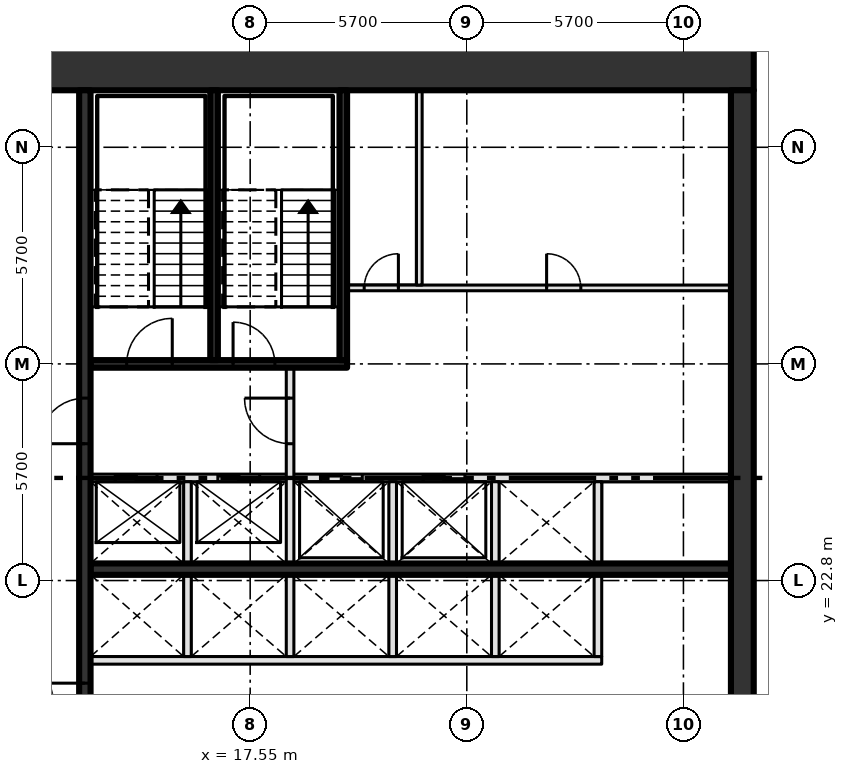
"""IFC4 building model, lengths in metres.
Left out: names, types, materials, properties, quantities, classifications, styles, units other than length and angle.
Written with IfcOpenShell. Run it as: python <this file> out.ifc"""

import sys

from ifc_helpers import new_model, si_unit, direction, frame, frame_2d, origin, place, context, subcontext, project, spatial, rectangle, extrude, element, fill, save


model = new_model("IFC4")
c1 = context("Model", 3, precision=1e-05, world=origin(), true_north=direction((0.0, 1.0)))
c2 = subcontext(c1, "Body", "Model", "MODEL_VIEW")
j1 = project(units=[si_unit("LENGTHUNIT", "METRE"), si_unit("PLANEANGLEUNIT", "RADIAN")], contexts=[c1])
p1 = place(None, origin())
s1 = spatial("IfcSite", under=j1, at=p1, CompositionType="ELEMENT")
p2 = place(p1, origin())
s2 = spatial("IfcBuilding", under=s1, at=p2, CompositionType="ELEMENT")
p3 = place(p2, frame((0.0, 0.0, 289.8)))
s3 = spatial("IfcBuildingStorey", under=s2, at=p3, CompositionType="ELEMENT", Elevation=289.8)
p4 = place(p3, frame((8.0, 36.3, -0.3), z_axis=(0.0, 0.0, 1.0), x_axis=(1.0, 0.0, 0.0)))
e1 = element("IfcWall", 1, at=p4, inside=s3, PredefinedType="SHEAR", context=c2, shape_type="SweptSolid", body=[
    extrude(rectangle(XDim=22.8, YDim=1.2, at=frame_2d((11.4, 0.0))), origin(), (0.0, 0.0, 1.0), 4.2),
])
p5 = place(p4, frame((2.3, 0.0, 0.3)))
e2 = element("IfcOpeningElement", 2, at=p5, cuts=e1, PredefinedType="OPENING", context=c2, shape_type="SweptSolid", body=[
    extrude(rectangle(XDim=1.8, YDim=2.1, at=frame_2d((0.9, 1.05))), frame((0.0, 0.61, 0.0), z_axis=(0.0, -1.0, 0.0), x_axis=(1.0, 0.0, 0.0)), (0.0, 0.0, 1.0), 1.22),
])
p6 = place(p3, frame((30.5, 14.7, -0.3), z_axis=(0.0, 0.0, 1.0), x_axis=(0.0, 1.0, 0.0)))
e3 = element("IfcWall", 3, at=p6, inside=s3, PredefinedType="SHEAR", context=c2, shape_type="SweptSolid", body=[
    extrude(rectangle(XDim=21.0, YDim=0.6, at=frame_2d((10.5, 0.0))), origin(), (0.0, 0.0, 1.0), 4.2),
])
p7 = place(p3, frame((13.35, 20.7, 0.0), z_axis=(0.0, 0.0, 1.0), x_axis=(1.0, 0.0, 0.0)))
e4 = element("IfcWall", 4, at=p7, inside=s3, PredefinedType="SOLIDWALL", context=c2, shape_type="SweptSolid", body=[
    extrude(rectangle(XDim=13.45, YDim=0.2, at=frame_2d((6.725, 0.0))), origin(), (0.0, 0.0, 1.0), 3.9),
])
p8 = place(p3, frame((13.35, 23.1, 0.0), z_axis=(0.0, 0.0, 1.0), x_axis=(1.0, 0.0, 0.0)))
e5 = element("IfcWall", 5, at=p8, inside=s3, PredefinedType="SHEAR", context=c2, shape_type="SweptSolid", body=[
    extrude(rectangle(XDim=16.85, YDim=0.3, at=frame_2d((8.425, 0.0))), origin(), (0.0, 0.0, 1.0), 3.9),
])
p9 = place(p3, frame((13.35, 25.5, 0.0), z_axis=(0.0, 0.0, 1.0), x_axis=(1.0, 0.0, 0.0)))
e6 = element("IfcWall", 6, at=p9, inside=s3, PredefinedType="SOLIDWALL", context=c2, shape_type="SweptSolid", body=[
    extrude(rectangle(XDim=16.85, YDim=0.2, at=frame_2d((8.425, 0.0))), origin(), (0.0, 0.0, 1.0), 3.9),
])
p10 = place(p9, frame((0.65, 0.0, 0.0)))
e7 = element("IfcOpeningElement", 7, at=p10, cuts=e6, PredefinedType="OPENING", context=c2, shape_type="SweptSolid", body=[
    extrude(rectangle(XDim=1.1, YDim=2.1, at=frame_2d((0.55, 1.05))), frame((0.0, 0.11, 0.0), z_axis=(0.0, -1.0, 0.0), x_axis=(1.0, 0.0, 0.0)), (0.0, 0.0, 1.0), 0.22),
])
p11 = place(p9, frame((3.35, 0.0, 0.0)))
e8 = element("IfcOpeningElement", 8, at=p11, cuts=e6, PredefinedType="OPENING", context=c2, shape_type="SweptSolid", body=[
    extrude(rectangle(XDim=1.1, YDim=2.1, at=frame_2d((0.55, 1.05))), frame((0.0, 0.11, 0.0), z_axis=(0.0, -1.0, 0.0), x_axis=(1.0, 0.0, 0.0)), (0.0, 0.0, 1.0), 0.22),
])
p12 = place(p9, frame((6.05, 0.0, 0.0)))
e9 = element("IfcOpeningElement", 9, at=p12, cuts=e6, PredefinedType="OPENING", context=c2, shape_type="SweptSolid", body=[
    extrude(rectangle(XDim=1.1, YDim=2.1, at=frame_2d((0.55, 1.05))), frame((0.0, 0.11, 0.0), z_axis=(0.0, -1.0, 0.0), x_axis=(1.0, 0.0, 0.0)), (0.0, 0.0, 1.0), 0.22),
])
p13 = place(p9, frame((8.75, 0.0, 0.0)))
e10 = element("IfcOpeningElement", 10, at=p13, cuts=e6, PredefinedType="OPENING", context=c2, shape_type="SweptSolid", body=[
    extrude(rectangle(XDim=1.1, YDim=2.1, at=frame_2d((0.55, 1.05))), frame((0.0, 0.11, 0.0), z_axis=(0.0, -1.0, 0.0), x_axis=(1.0, 0.0, 0.0)), (0.0, 0.0, 1.0), 0.22),
])
p14 = place(p3, frame((13.35, 28.5, 0.0), z_axis=(0.0, 0.0, 1.0), x_axis=(1.0, 0.0, 0.0)))
e11 = element("IfcWall", 11, at=p14, inside=s3, PredefinedType="SOLIDWALL", context=c2, shape_type="SweptSolid", body=[
    extrude(rectangle(XDim=6.75, YDim=0.2, at=frame_2d((3.375, 0.0))), origin(), (0.0, 0.0, 1.0), 3.9),
])
p15 = place(p14, frame((0.95, 0.0, 0.0)))
e12 = element("IfcOpeningElement", 12, at=p15, cuts=e11, PredefinedType="OPENING", context=c2, shape_type="SweptSolid", body=[
    extrude(rectangle(XDim=1.2, YDim=2.1, at=frame_2d((0.6, 1.05))), frame((0.0, 0.11, 0.0), z_axis=(0.0, -1.0, 0.0), x_axis=(1.0, 0.0, 0.0)), (0.0, 0.0, 1.0), 0.22),
])
p16 = place(p14, frame((3.75, 0.0, 0.0)))
e13 = element("IfcOpeningElement", 13, at=p16, cuts=e11, PredefinedType="OPENING", context=c2, shape_type="SweptSolid", body=[
    extrude(rectangle(XDim=1.1, YDim=2.1, at=frame_2d((0.55, 1.05))), frame((0.0, 0.11, 0.0), z_axis=(0.0, -1.0, 0.0), x_axis=(1.0, 0.0, 0.0)), (0.0, 0.0, 1.0), 0.22),
])
p17 = place(p3, frame((20.1, 30.5, 0.0), z_axis=(0.0, 0.0, 1.0), x_axis=(1.0, 0.0, 0.0)))
e14 = element("IfcWall", 14, at=p17, inside=s3, PredefinedType="PARTITIONING", context=c2, shape_type="SweptSolid", body=[
    extrude(rectangle(XDim=10.1, YDim=0.15, at=frame_2d((5.05, 0.0))), origin(), (0.0, 0.0, 1.0), 3.9),
])
p18 = place(p17, frame((0.45, 0.0, 0.0)))
e15 = element("IfcOpeningElement", 15, at=p18, cuts=e14, PredefinedType="OPENING", context=c2, shape_type="SweptSolid", body=[
    extrude(rectangle(XDim=0.9, YDim=2.1, at=frame_2d((0.45, 1.05))), frame((0.0, 0.085, 0.0), z_axis=(0.0, -1.0, 0.0), x_axis=(1.0, 0.0, 0.0)), (0.0, 0.0, 1.0), 0.17),
])
p19 = place(p17, frame((5.25, 0.0, 0.0)))
e16 = element("IfcOpeningElement", 16, at=p19, cuts=e14, PredefinedType="OPENING", context=c2, shape_type="SweptSolid", body=[
    extrude(rectangle(XDim=0.9, YDim=2.1, at=frame_2d((0.45, 1.05))), frame((0.0, 0.085, 0.0), z_axis=(0.0, -1.0, 0.0), x_axis=(1.0, 0.0, 0.0)), (0.0, 0.0, 1.0), 0.17),
])
p20 = place(p3, frame((13.2, 14.7, 0.0), z_axis=(0.0, 0.0, 1.0), x_axis=(0.0, 1.0, 0.0)))
e17 = element("IfcWall", 17, at=p20, inside=s3, PredefinedType="SHEAR", context=c2, shape_type="SweptSolid", body=[
    extrude(rectangle(XDim=21.0, YDim=0.3, at=frame_2d((10.5, 0.0))), origin(), (0.0, 0.0, 1.0), 3.9),
])
p21 = place(p20, frame((3.6, 0.0, 0.0)))
e18 = element("IfcOpeningElement", 18, at=p21, cuts=e17, PredefinedType="OPENING", context=c2, shape_type="SweptSolid", body=[
    extrude(rectangle(XDim=1.8, YDim=2.1, at=frame_2d((0.9, 1.05))), frame((0.0, 0.16, 0.0), z_axis=(0.0, -1.0, 0.0), x_axis=(1.0, 0.0, 0.0)), (0.0, 0.0, 1.0), 0.32),
])
p22 = place(p20, frame((11.7, 0.0, 0.0)))
e19 = element("IfcOpeningElement", 19, at=p22, cuts=e17, PredefinedType="OPENING", context=c2, shape_type="SweptSolid", body=[
    extrude(rectangle(XDim=1.2, YDim=2.1, at=frame_2d((0.6, 1.05))), frame((0.0, 0.16, 0.0), z_axis=(0.0, -1.0, 0.0), x_axis=(1.0, 0.0, 0.0)), (0.0, 0.0, 1.0), 0.32),
])
p23 = place(p3, frame((15.9, 20.8, 0.0), z_axis=(0.0, 0.0, 1.0), x_axis=(0.0, 1.0, 0.0)))
e20 = element("IfcWall", 20, at=p23, inside=s3, PredefinedType="SOLIDWALL", context=c2, shape_type="SweptSolid", body=[
    extrude(rectangle(XDim=4.6, YDim=0.2, at=frame_2d((2.3, 0.0))), origin(), (0.0, 0.0, 1.0), 3.9),
])
p24 = place(p3, frame((16.6, 28.6, 0.0), z_axis=(0.0, 0.0, 1.0), x_axis=(0.0, 1.0, 0.0)))
e21 = element("IfcWall", 21, at=p24, inside=s3, PredefinedType="SOLIDWALL", context=c2, shape_type="SweptSolid", body=[
    extrude(rectangle(XDim=7.1, YDim=0.2, at=frame_2d((3.55, 0.0))), origin(), (0.0, 0.0, 1.0), 3.9),
])
p25 = place(p3, frame((18.6, 20.8, 0.0), z_axis=(0.0, 0.0, 1.0), x_axis=(0.0, 1.0, 0.0)))
e22 = element("IfcWall", 22, at=p25, inside=s3, PredefinedType="SOLIDWALL", context=c2, shape_type="SweptSolid", body=[
    extrude(rectangle(XDim=7.6, YDim=0.2, at=frame_2d((3.8, 0.0))), origin(), (0.0, 0.0, 1.0), 3.9),
])
p26 = place(p25, frame((5.6, 0.0, 0.0)))
e23 = element("IfcOpeningElement", 23, at=p26, cuts=e22, PredefinedType="OPENING", context=c2, shape_type="SweptSolid", body=[
    extrude(rectangle(XDim=1.2, YDim=2.1, at=frame_2d((0.6, 1.05))), frame((0.0, 0.11, 0.0), z_axis=(0.0, -1.0, 0.0), x_axis=(1.0, 0.0, 0.0)), (0.0, 0.0, 1.0), 0.22),
])
p27 = place(p3, frame((20.0, 28.6, 0.0), z_axis=(0.0, 0.0, 1.0), x_axis=(0.0, 1.0, 0.0)))
e24 = element("IfcWall", 24, at=p27, inside=s3, PredefinedType="SOLIDWALL", context=c2, shape_type="SweptSolid", body=[
    extrude(rectangle(XDim=7.1, YDim=0.2, at=frame_2d((3.55, 0.0))), origin(), (0.0, 0.0, 1.0), 3.9),
])
p28 = place(p3, frame((21.3, 20.8, 0.0), z_axis=(0.0, 0.0, 1.0), x_axis=(0.0, 1.0, 0.0)))
e25 = element("IfcWall", 25, at=p28, inside=s3, PredefinedType="SOLIDWALL", context=c2, shape_type="SweptSolid", body=[
    extrude(rectangle(XDim=4.6, YDim=0.2, at=frame_2d((2.3, 0.0))), origin(), (0.0, 0.0, 1.0), 3.9),
])
p29 = place(p3, frame((22.0, 30.575, 0.0), z_axis=(0.0, 0.0, 1.0), x_axis=(0.0, 1.0, 0.0)))
e26 = element("IfcWall", 26, at=p29, inside=s3, PredefinedType="PARTITIONING", context=c2, shape_type="SweptSolid", body=[
    extrude(rectangle(XDim=5.125, YDim=0.15, at=frame_2d((2.562, 0.0))), origin(), (0.0, 0.0, 1.0), 3.9),
])
for number, where, z_axis, x_axis in (
    (27, (24.0, 20.8, 0.0), (0.0, 0.0, 1.0), (0.0, 1.0, 0.0)),
    (28, (26.7, 20.8, 0.0), (0.0, 0.0, 1.0), (0.0, 1.0, 0.0)),
):
    element("IfcWall", number, at=place(p3, frame(where, z_axis=z_axis, x_axis=x_axis)), inside=s3, PredefinedType="SOLIDWALL", context=c2, shape_type="SweptSolid", body=[
        extrude(rectangle(XDim=4.6, YDim=0.2, at=frame_2d((2.3, 0.0))), origin(), (0.0, 0.0, 1.0), 3.9),
    ])
p30 = place(p10, origin())
e29 = element("IfcDoor", 29, at=p30, inside=s3, OperationType="SLIDING_TO_LEFT", PredefinedType="DOOR", context=c2, shape_type="SweptSolid", body=[
    extrude(rectangle(XDim=1.1, YDim=2.1, at=frame_2d((0.55, 1.05))), frame((0.0, 0.025, 0.0), z_axis=(0.0, -1.0, 0.0), x_axis=(1.0, 0.0, 0.0)), (0.0, 0.0, 1.0), 0.05),
])
fill(e7, e29)
p31 = place(p11, origin())
e30 = element("IfcDoor", 30, at=p31, inside=s3, OperationType="SLIDING_TO_LEFT", PredefinedType="DOOR", context=c2, shape_type="SweptSolid", body=[
    extrude(rectangle(XDim=1.1, YDim=2.1, at=frame_2d((0.55, 1.05))), frame((0.0, 0.025, 0.0), z_axis=(0.0, -1.0, 0.0), x_axis=(1.0, 0.0, 0.0)), (0.0, 0.0, 1.0), 0.05),
])
fill(e8, e30)
p32 = place(p12, origin())
e31 = element("IfcDoor", 31, at=p32, inside=s3, OperationType="SLIDING_TO_LEFT", PredefinedType="DOOR", context=c2, shape_type="SweptSolid", body=[
    extrude(rectangle(XDim=1.1, YDim=2.1, at=frame_2d((0.55, 1.05))), frame((0.0, 0.025, 0.0), z_axis=(0.0, -1.0, 0.0), x_axis=(1.0, 0.0, 0.0)), (0.0, 0.0, 1.0), 0.05),
])
fill(e9, e31)
p33 = place(p13, origin())
e32 = element("IfcDoor", 32, at=p33, inside=s3, OperationType="SLIDING_TO_LEFT", PredefinedType="DOOR", context=c2, shape_type="SweptSolid", body=[
    extrude(rectangle(XDim=1.1, YDim=2.1, at=frame_2d((0.55, 1.05))), frame((0.0, 0.025, 0.0), z_axis=(0.0, -1.0, 0.0), x_axis=(1.0, 0.0, 0.0)), (0.0, 0.0, 1.0), 0.05),
])
fill(e10, e32)
p34 = place(p18, origin())
e33 = element("IfcDoor", 33, at=p34, inside=s3, OperationType="SINGLE_SWING_RIGHT", PredefinedType="DOOR", context=c2, shape_type="SweptSolid", body=[
    extrude(rectangle(XDim=0.9, YDim=2.1, at=frame_2d((0.45, 1.05))), frame((0.0, 0.025, 0.0), z_axis=(0.0, -1.0, 0.0), x_axis=(1.0, 0.0, 0.0)), (0.0, 0.0, 1.0), 0.05),
])
fill(e15, e33)
p35 = place(p19, origin())
e34 = element("IfcDoor", 34, at=p35, inside=s3, OperationType="SINGLE_SWING_LEFT", PredefinedType="DOOR", context=c2, shape_type="SweptSolid", body=[
    extrude(rectangle(XDim=0.9, YDim=2.1, at=frame_2d((0.45, 1.05))), frame((0.0, 0.025, 0.0), z_axis=(0.0, -1.0, 0.0), x_axis=(1.0, 0.0, 0.0)), (0.0, 0.0, 1.0), 0.05),
])
fill(e16, e34)
p36 = place(p15, origin())
e35 = element("IfcDoor", 35, at=p36, inside=s3, OperationType="SINGLE_SWING_RIGHT", PredefinedType="DOOR", context=c2, shape_type="SweptSolid", body=[
    extrude(rectangle(XDim=1.2, YDim=2.1, at=frame_2d((0.6, 1.05))), frame((0.0, 0.025, 0.0), z_axis=(0.0, -1.0, 0.0), x_axis=(1.0, 0.0, 0.0)), (0.0, 0.0, 1.0), 0.05),
])
fill(e12, e35)
p37 = place(p16, origin())
e36 = element("IfcDoor", 36, at=p37, inside=s3, OperationType="SINGLE_SWING_LEFT", PredefinedType="DOOR", context=c2, shape_type="SweptSolid", body=[
    extrude(rectangle(XDim=1.1, YDim=2.1, at=frame_2d((0.55, 1.05))), frame((0.0, 0.025, 0.0), z_axis=(0.0, -1.0, 0.0), x_axis=(1.0, 0.0, 0.0)), (0.0, 0.0, 1.0), 0.05),
])
fill(e13, e36)
p38 = place(p21, origin())
e37 = element("IfcDoor", 37, at=p38, inside=s3, OperationType="DOUBLE_DOOR_SINGLE_SWING", PredefinedType="DOOR", context=c2, shape_type="SweptSolid", body=[
    extrude(rectangle(XDim=1.8, YDim=2.1, at=frame_2d((0.9, 1.05))), frame((0.0, 0.025, 0.0), z_axis=(0.0, -1.0, 0.0), x_axis=(1.0, 0.0, 0.0)), (0.0, 0.0, 1.0), 0.05),
])
fill(e18, e37)
p39 = place(p22, origin())
e38 = element("IfcDoor", 38, at=p39, inside=s3, OperationType="SINGLE_SWING_LEFT", PredefinedType="DOOR", context=c2, shape_type="SweptSolid", body=[
    extrude(rectangle(XDim=1.2, YDim=2.1, at=frame_2d((0.6, 1.05))), frame((0.0, 0.025, 0.0), z_axis=(0.0, -1.0, 0.0), x_axis=(1.0, 0.0, 0.0)), (0.0, 0.0, 1.0), 0.05),
])
fill(e19, e38)
p40 = place(p26, origin())
e39 = element("IfcDoor", 39, at=p40, inside=s3, OperationType="SINGLE_SWING_RIGHT", PredefinedType="DOOR", context=c2, shape_type="SweptSolid", body=[
    extrude(rectangle(XDim=1.2, YDim=2.1, at=frame_2d((0.6, 1.05))), frame((0.0, 0.025, 0.0), z_axis=(0.0, -1.0, 0.0), x_axis=(1.0, 0.0, 0.0)), (0.0, 0.0, 1.0), 0.05),
])
fill(e23, e39)
save(model, sys.argv[1])
